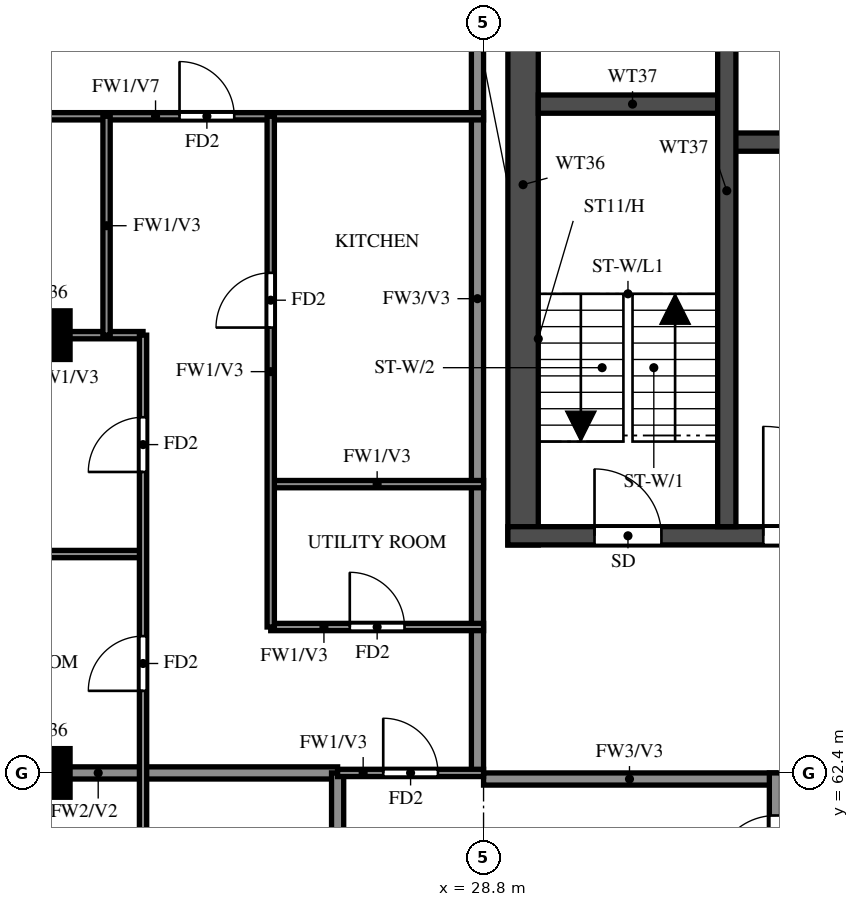
"""IFC4 building model, lengths in metres.
Left out: names, types, materials, properties, quantities, classifications, styles, units other than length and angle.
Written with IfcOpenShell. Run it as: python <this file> out.ifc"""

import sys

from ifc_helpers import new_model, si_unit, direction, frame, frame_2d, origin, origin_2d, place, context, subcontext, project, spatial, rectangle, extrude, source, transform, mapped, element, fill, save


model = new_model("IFC4")
c1 = context("Model", 3, precision=1e-05, world=origin(), true_north=direction((0.0, 1.0)))
c2 = subcontext(c1, "Body", "Model", "MODEL_VIEW")
j1 = project(units=[si_unit("LENGTHUNIT", "METRE"), si_unit("PLANEANGLEUNIT", "RADIAN")], contexts=[c1])
p1 = place(None, origin())
s1 = spatial("IfcSite", under=j1, at=p1, CompositionType="ELEMENT")
p2 = place(p1, origin())
s2 = spatial("IfcBuilding", under=s1, at=p2, CompositionType="ELEMENT")
p3 = place(p2, frame((0.0, 0.0, 246.5)))
s3 = spatial("IfcBuildingStorey", under=s2, at=p3, CompositionType="ELEMENT", Elevation=246.5)
m1 = source(origin(), c2, "Body", "SweptSolid", [
    extrude(rectangle(XDim=0.8, YDim=0.8, at=origin_2d()), origin(), (0.0, 0.0, 1.0), 3.22),
])
for number, where, z_axis, x_axis in (
    (1, (21.6, 62.4, 0.0), (0.0, 0.0, 1.0), (1.0, 0.0, 0.0)),
    (2, (21.6, 69.6, 0.0), (0.0, 0.0, 1.0), (1.0, 0.0, 0.0)),
):
    element("IfcColumn", number, at=place(p3, frame(where, z_axis=z_axis, x_axis=x_axis)), inside=s3, PredefinedType="COLUMN", context=c2, shape_type="MappedRepresentation", body=[
        mapped(m1, transform((0.0, 0.0, 0.0))),
    ])
p4 = place(p3, frame((29.45, 66.15, 0.0), z_axis=(0.0, 0.0, 1.0), x_axis=(0.0, 1.0, 0.0)))
e3 = element("IfcWall", 3, at=p4, inside=s3, PredefinedType="SHEAR", context=c2, shape_type="SweptSolid", body=[
    extrude(rectangle(XDim=11.85, YDim=0.5, at=frame_2d((5.925, 0.0))), origin(), (0.0, 0.0, 1.0), 3.22),
])
p5 = place(p3, frame((29.2, 66.3, 0.0), z_axis=(0.0, 0.0, 1.0), x_axis=(1.0, 0.0, 0.0)))
e4 = element("IfcWall", 4, at=p5, inside=s3, PredefinedType="SHEAR", context=c2, shape_type="SweptSolid", body=[
    extrude(rectangle(XDim=42.4, YDim=0.3, at=frame_2d((21.2, 0.0))), origin(), (0.0, 0.0, 1.0), 3.22),
])
p6 = place(p5, frame((1.425, 0.0, 0.0)))
e5 = element("IfcOpeningElement", 5, at=p6, cuts=e4, PredefinedType="OPENING", context=c2, shape_type="SweptSolid", body=[
    extrude(rectangle(XDim=1.1, YDim=2.1, at=frame_2d((0.55, 1.05))), frame((0.0, 0.16, 0.0), z_axis=(0.0, -1.0, 0.0), x_axis=(1.0, 0.0, 0.0)), (0.0, 0.0, 1.0), 0.32),
])
p7 = place(p5, frame((4.2, 0.0, 0.0)))
e6 = element("IfcOpeningElement", 6, at=p7, cuts=e4, PredefinedType="OPENING", context=c2, shape_type="SweptSolid", body=[
    extrude(rectangle(XDim=1.8, YDim=2.1, at=frame_2d((0.9, 1.05))), frame((0.0, 0.16, 0.0), z_axis=(0.0, -1.0, 0.0), x_axis=(1.0, 0.0, 0.0)), (0.0, 0.0, 1.0), 0.32),
])
p8 = place(p3, frame((32.8, 72.775, 0.0), z_axis=(0.0, 0.0, 1.0), x_axis=(1.0, 0.0, 0.0)))
e7 = element("IfcWall", 7, at=p8, inside=s3, PredefinedType="SHEAR", context=c2, shape_type="SweptSolid", body=[
    extrude(rectangle(XDim=35.2, YDim=0.3, at=frame_2d((17.6, 0.0))), origin(), (0.0, 0.0, 1.0), 3.22),
])
p9 = place(p8, frame((19.8, 0.0, 0.0)))
e8 = element("IfcOpeningElement", 8, at=p9, cuts=e7, PredefinedType="OPENING", context=c2, shape_type="SweptSolid", body=[
    extrude(rectangle(XDim=1.1, YDim=2.1, at=frame_2d((0.55, 1.05))), frame((0.0, 0.16, 0.0), z_axis=(0.0, -1.0, 0.0), x_axis=(1.0, 0.0, 0.0)), (0.0, 0.0, 1.0), 0.32),
])
p10 = place(p8, frame((27.725, 0.0, 0.0)))
e9 = element("IfcOpeningElement", 9, at=p10, cuts=e7, PredefinedType="OPENING", context=c2, shape_type="SweptSolid", body=[
    extrude(rectangle(XDim=1.1, YDim=2.1, at=frame_2d((0.55, 1.05))), frame((0.0, 0.16, 0.0), z_axis=(0.0, -1.0, 0.0), x_axis=(1.0, 0.0, 0.0)), (0.0, 0.0, 1.0), 0.32),
])
p11 = place(p8, frame((30.325, 0.0, 0.0)))
e10 = element("IfcOpeningElement", 10, at=p11, cuts=e7, PredefinedType="OPENING", context=c2, shape_type="SweptSolid", body=[
    extrude(rectangle(XDim=1.1, YDim=2.1, at=frame_2d((0.55, 1.05))), frame((0.0, 0.16, 0.0), z_axis=(0.0, -1.0, 0.0), x_axis=(1.0, 0.0, 0.0)), (0.0, 0.0, 1.0), 0.32),
])
p12 = place(p8, frame((3.825, 0.0, 0.0)))
e11 = element("IfcOpeningElement", 11, at=p12, cuts=e7, PredefinedType="OPENING", context=c2, shape_type="SweptSolid", body=[
    extrude(rectangle(XDim=1.1, YDim=2.1, at=frame_2d((0.55, 1.05))), frame((0.0, 0.16, 0.0), z_axis=(0.0, -1.0, 0.0), x_axis=(1.0, 0.0, 0.0)), (0.0, 0.0, 1.0), 0.32),
])
p13 = place(p8, frame((6.575, 0.0, 0.0)))
e12 = element("IfcOpeningElement", 12, at=p13, cuts=e7, PredefinedType="OPENING", context=c2, shape_type="SweptSolid", body=[
    extrude(rectangle(XDim=1.1, YDim=2.1, at=frame_2d((0.55, 1.05))), frame((0.0, 0.16, 0.0), z_axis=(0.0, -1.0, 0.0), x_axis=(1.0, 0.0, 0.0)), (0.0, 0.0, 1.0), 0.32),
])
p14 = place(p8, frame((9.325, 0.0, 0.0)))
e13 = element("IfcOpeningElement", 13, at=p14, cuts=e7, PredefinedType="OPENING", context=c2, shape_type="SweptSolid", body=[
    extrude(rectangle(XDim=1.1, YDim=2.1, at=frame_2d((0.55, 1.05))), frame((0.0, 0.16, 0.0), z_axis=(0.0, -1.0, 0.0), x_axis=(1.0, 0.0, 0.0)), (0.0, 0.0, 1.0), 0.32),
])
p15 = place(p8, frame((12.075, 0.0, 0.0)))
e14 = element("IfcOpeningElement", 14, at=p15, cuts=e7, PredefinedType="OPENING", context=c2, shape_type="SweptSolid", body=[
    extrude(rectangle(XDim=1.1, YDim=2.1, at=frame_2d((0.55, 1.05))), frame((0.0, 0.16, 0.0), z_axis=(0.0, -1.0, 0.0), x_axis=(1.0, 0.0, 0.0)), (0.0, 0.0, 1.0), 0.32),
])
p16 = place(p8, frame((14.825, 0.0, 0.0)))
e15 = element("IfcOpeningElement", 15, at=p16, cuts=e7, PredefinedType="OPENING", context=c2, shape_type="SweptSolid", body=[
    extrude(rectangle(XDim=1.1, YDim=2.1, at=frame_2d((0.55, 1.05))), frame((0.0, 0.16, 0.0), z_axis=(0.0, -1.0, 0.0), x_axis=(1.0, 0.0, 0.0)), (0.0, 0.0, 1.0), 0.32),
])
p17 = place(p8, frame((17.575, 0.0, 0.0)))
e16 = element("IfcOpeningElement", 16, at=p17, cuts=e7, PredefinedType="OPENING", context=c2, shape_type="SweptSolid", body=[
    extrude(rectangle(XDim=1.1, YDim=2.1, at=frame_2d((0.55, 1.05))), frame((0.0, 0.16, 0.0), z_axis=(0.0, -1.0, 0.0), x_axis=(1.0, 0.0, 0.0)), (0.0, 0.0, 1.0), 0.32),
])
p18 = place(p8, frame((0.95, 0.0, 0.0)))
e17 = element("IfcOpeningElement", 17, at=p18, cuts=e7, PredefinedType="OPENING", context=c2, shape_type="SweptSolid", body=[
    extrude(rectangle(XDim=1.1, YDim=2.1, at=frame_2d((0.55, 1.05))), frame((0.0, 0.16, 0.0), z_axis=(0.0, -1.0, 0.0), x_axis=(1.0, 0.0, 0.0)), (0.0, 0.0, 1.0), 0.32),
])
p19 = place(p3, frame((29.7, 73.4, 0.0), z_axis=(0.0, 0.0, 1.0), x_axis=(1.0, 0.0, 0.0)))
e18 = element("IfcWall", 18, at=p19, inside=s3, PredefinedType="SHEAR", context=c2, shape_type="SweptSolid", body=[
    extrude(rectangle(XDim=3.1, YDim=0.3, at=frame_2d((1.55, 0.0))), origin(), (0.0, 0.0, 1.0), 3.22),
])
p20 = place(p3, frame((32.8, 66.45, 0.0), z_axis=(0.0, 0.0, 1.0), x_axis=(0.0, 1.0, 0.0)))
e19 = element("IfcWall", 19, at=p20, inside=s3, PredefinedType="SHEAR", context=c2, shape_type="SweptSolid", body=[
    extrude(rectangle(XDim=11.05, YDim=0.3, at=frame_2d((5.525, 0.0))), origin(), (0.0, 0.0, 1.0), 3.22),
])
p21 = place(p3, frame((28.8, 62.3, 0.0), z_axis=(0.0, 0.0, 1.0), x_axis=(1.0, 0.0, 0.0)))
e20 = element("IfcWall", 20, at=p21, inside=s3, PredefinedType="SOLIDWALL", context=c2, shape_type="SweptSolid", body=[
    extrude(rectangle(XDim=4.8, YDim=0.2, at=frame_2d((2.4, 0.0))), origin(), (0.0, 0.0, 1.0), 3.22),
])
p22 = place(p3, frame((28.7, 62.4, 0.0), z_axis=(0.0, 0.0, 1.0), x_axis=(0.0, 1.0, 0.0)))
e21 = element("IfcWall", 21, at=p22, inside=s3, PredefinedType="SOLIDWALL", context=c2, shape_type="SweptSolid", body=[
    extrude(rectangle(XDim=15.6, YDim=0.2, at=frame_2d((7.8, 0.0))), origin(), (0.0, 0.0, 1.0), 3.22),
])
p23 = place(p3, frame((33.6, 45.6, 0.0), z_axis=(0.0, 0.0, 1.0), x_axis=(0.0, 1.0, 0.0)))
e22 = element("IfcWall", 22, at=p23, inside=s3, PredefinedType="SOLIDWALL", context=c2, shape_type="SweptSolid", body=[
    extrude(rectangle(XDim=16.8, YDim=0.2, at=frame_2d((8.4, 0.0))), origin(), (0.0, 0.0, 1.0), 3.22),
])
p24 = place(p23, frame((0.7, 0.0, 0.0)))
e23 = element("IfcOpeningElement", 23, at=p24, cuts=e22, PredefinedType="OPENING", context=c2, shape_type="SweptSolid", body=[
    extrude(rectangle(XDim=1.0, YDim=2.1, at=frame_2d((0.5, 1.05))), frame((0.0, 0.11, 0.0), z_axis=(0.0, -1.0, 0.0), x_axis=(1.0, 0.0, 0.0)), (0.0, 0.0, 1.0), 0.22),
])
p25 = place(p23, frame((8.3, 0.0, 0.0)))
e24 = element("IfcOpeningElement", 24, at=p25, cuts=e22, PredefinedType="OPENING", context=c2, shape_type="SweptSolid", body=[
    extrude(rectangle(XDim=1.0, YDim=2.1, at=frame_2d((0.5, 1.05))), frame((0.0, 0.11, 0.0), z_axis=(0.0, -1.0, 0.0), x_axis=(1.0, 0.0, 0.0)), (0.0, 0.0, 1.0), 0.22),
])
p26 = place(p23, frame((15.1, 0.0, 0.0)))
e25 = element("IfcOpeningElement", 25, at=p26, cuts=e22, PredefinedType="OPENING", context=c2, shape_type="SweptSolid", body=[
    extrude(rectangle(XDim=1.0, YDim=2.1, at=frame_2d((0.5, 1.05))), frame((0.0, 0.11, 0.0), z_axis=(0.0, -1.0, 0.0), x_axis=(1.0, 0.0, 0.0)), (0.0, 0.0, 1.0), 0.22),
])
p27 = place(p3, frame((18.525, 62.4, 0.0), z_axis=(0.0, 0.0, 1.0), x_axis=(1.0, 0.0, 0.0)))
e26 = element("IfcWall", 26, at=p27, inside=s3, PredefinedType="SOLIDWALL", context=c2, shape_type="SweptSolid", body=[
    extrude(rectangle(XDim=7.875, YDim=0.2, at=frame_2d((3.938, 0.0))), origin(), (0.0, 0.0, 1.0), 3.22),
])
p28 = place(p3, frame((26.4, 60.0, 0.0), z_axis=(0.0, 0.0, 1.0), x_axis=(0.0, 1.0, 0.0)))
e27 = element("IfcWall", 27, at=p28, inside=s3, PredefinedType="SOLIDWALL", context=c2, shape_type="SweptSolid", body=[
    extrude(rectangle(XDim=2.4, YDim=0.2, at=frame_2d((1.2, 0.0))), origin(), (0.0, 0.0, 1.0), 3.22),
])
p29 = place(p3, frame((26.4, 62.4, 0.0), z_axis=(0.0, 0.0, 1.0), x_axis=(1.0, 0.0, 0.0)))
e28 = element("IfcWall", 28, at=p29, inside=s3, PredefinedType="PARTITIONING", context=c2, shape_type="SweptSolid", body=[
    extrude(rectangle(XDim=2.4, YDim=0.12, at=frame_2d((1.2, 0.0))), origin(), (0.0, 0.0, 1.0), 3.22),
])
p30 = place(p29, frame((0.75, 0.0, 0.0)))
e29 = element("IfcOpeningElement", 29, at=p30, cuts=e28, PredefinedType="OPENING", context=c2, shape_type="SweptSolid", body=[
    extrude(rectangle(XDim=0.9, YDim=2.1, at=frame_2d((0.45, 1.05))), frame((0.0, 0.07, 0.0), z_axis=(0.0, -1.0, 0.0), x_axis=(1.0, 0.0, 0.0)), (0.0, 0.0, 1.0), 0.14),
])
p31 = place(p3, frame((25.3, 64.8, 0.0), z_axis=(0.0, 0.0, 1.0), x_axis=(1.0, 0.0, 0.0)))
e30 = element("IfcWall", 30, at=p31, inside=s3, PredefinedType="PARTITIONING", context=c2, shape_type="SweptSolid", body=[
    extrude(rectangle(XDim=3.5, YDim=0.12, at=frame_2d((1.75, 0.0))), origin(), (0.0, 0.0, 1.0), 3.22),
])
p32 = place(p31, frame((1.3, 0.0, 0.0)))
e31 = element("IfcOpeningElement", 31, at=p32, cuts=e30, PredefinedType="OPENING", context=c2, shape_type="SweptSolid", body=[
    extrude(rectangle(XDim=0.9, YDim=2.1, at=frame_2d((0.45, 1.05))), frame((0.0, 0.07, 0.0), z_axis=(0.0, -1.0, 0.0), x_axis=(1.0, 0.0, 0.0)), (0.0, 0.0, 1.0), 0.14),
])
p33 = place(p3, frame((18.525, 66.0, 0.0), z_axis=(0.0, 0.0, 1.0), x_axis=(1.0, 0.0, 0.0)))
e32 = element("IfcWall", 32, at=p33, inside=s3, PredefinedType="PARTITIONING", context=c2, shape_type="SweptSolid", body=[
    extrude(rectangle(XDim=4.675, YDim=0.12, at=frame_2d((2.337, 0.0))), origin(), (0.0, 0.0, 1.0), 2.32),
])
p34 = place(p3, frame((25.3, 67.15, 0.0), z_axis=(0.0, 0.0, 1.0), x_axis=(1.0, 0.0, 0.0)))
e33 = element("IfcWall", 33, at=p34, inside=s3, PredefinedType="PARTITIONING", context=c2, shape_type="SweptSolid", body=[
    extrude(rectangle(XDim=3.5, YDim=0.12, at=frame_2d((1.75, 0.0))), origin(), (0.0, 0.0, 1.0), 3.22),
])
p35 = place(p3, frame((18.525, 69.6, 0.0), z_axis=(0.0, 0.0, 1.0), x_axis=(1.0, 0.0, 0.0)))
e34 = element("IfcWall", 34, at=p35, inside=s3, PredefinedType="PARTITIONING", context=c2, shape_type="SweptSolid", body=[
    extrude(rectangle(XDim=4.675, YDim=0.12, at=frame_2d((2.337, 0.0))), origin(), (0.0, 0.0, 1.0), 3.22),
])
p36 = place(p35, frame((1.538, 0.0, 0.0)))
e35 = element("IfcOpeningElement", 35, at=p36, cuts=e34, PredefinedType="OPENING", context=c2, shape_type="SweptSolid", body=[
    extrude(rectangle(XDim=0.8, YDim=2.1, at=frame_2d((0.4, 1.05))), frame((0.0, 0.07, 0.0), z_axis=(0.0, -1.0, 0.0), x_axis=(1.0, 0.0, 0.0)), (0.0, 0.0, 1.0), 0.14),
])
p37 = place(p3, frame((18.525, 73.2, 0.0), z_axis=(0.0, 0.0, 1.0), x_axis=(1.0, 0.0, 0.0)))
e36 = element("IfcWall", 36, at=p37, inside=s3, PredefinedType="PARTITIONING", context=c2, shape_type="SweptSolid", body=[
    extrude(rectangle(XDim=10.275, YDim=0.12, at=frame_2d((5.138, 0.0))), origin(), (0.0, 0.0, 1.0), 2.32),
])
p38 = place(p37, frame((5.275, 0.0, 0.0)))
e37 = element("IfcOpeningElement", 37, at=p38, cuts=e36, PredefinedType="OPENING", context=c2, shape_type="SweptSolid", body=[
    extrude(rectangle(XDim=0.9, YDim=2.1, at=frame_2d((0.45, 1.05))), frame((0.0, 0.07, 0.0), z_axis=(0.0, -1.0, 0.0), x_axis=(1.0, 0.0, 0.0)), (0.0, 0.0, 1.0), 0.14),
])
p39 = place(p3, frame((22.6, 69.6, 0.0), z_axis=(0.0, 0.0, 1.0), x_axis=(0.0, 1.0, 0.0)))
e38 = element("IfcWall", 38, at=p39, inside=s3, PredefinedType="PARTITIONING", context=c2, shape_type="SweptSolid", body=[
    extrude(rectangle(XDim=3.6, YDim=0.12, at=frame_2d((1.8, 0.0))), origin(), (0.0, 0.0, 1.0), 3.22),
])
p40 = place(p3, frame((23.2, 48.0, 0.0), z_axis=(0.0, 0.0, 1.0), x_axis=(0.0, 1.0, 0.0)))
e39 = element("IfcWall", 39, at=p40, inside=s3, PredefinedType="PARTITIONING", context=c2, shape_type="SweptSolid", body=[
    extrude(rectangle(XDim=21.6, YDim=0.12, at=frame_2d((10.8, 0.0))), origin(), (0.0, 0.0, 1.0), 3.22),
])
p41 = place(p40, frame((1.35, 0.0, 0.0)))
e40 = element("IfcOpeningElement", 40, at=p41, cuts=e39, PredefinedType="OPENING", context=c2, shape_type="SweptSolid", body=[
    extrude(rectangle(XDim=0.9, YDim=2.1, at=frame_2d((0.45, 1.05))), frame((0.0, 0.07, 0.0), z_axis=(0.0, -1.0, 0.0), x_axis=(1.0, 0.0, 0.0)), (0.0, 0.0, 1.0), 0.14),
])
p42 = place(p40, frame((7.95, 0.0, 0.0)))
e41 = element("IfcOpeningElement", 41, at=p42, cuts=e39, PredefinedType="OPENING", context=c2, shape_type="SweptSolid", body=[
    extrude(rectangle(XDim=1.5, YDim=2.1, at=frame_2d((0.75, 1.05))), frame((0.0, 0.07, 0.0), z_axis=(0.0, -1.0, 0.0), x_axis=(1.0, 0.0, 0.0)), (0.0, 0.0, 1.0), 0.14),
])
p43 = place(p40, frame((12.15, 0.0, 0.0)))
e42 = element("IfcOpeningElement", 42, at=p43, cuts=e39, PredefinedType="OPENING", context=c2, shape_type="SweptSolid", body=[
    extrude(rectangle(XDim=0.9, YDim=2.1, at=frame_2d((0.45, 1.05))), frame((0.0, 0.07, 0.0), z_axis=(0.0, -1.0, 0.0), x_axis=(1.0, 0.0, 0.0)), (0.0, 0.0, 1.0), 0.14),
])
p44 = place(p40, frame((15.75, 0.0, 0.0)))
e43 = element("IfcOpeningElement", 43, at=p44, cuts=e39, PredefinedType="OPENING", context=c2, shape_type="SweptSolid", body=[
    extrude(rectangle(XDim=0.9, YDim=2.1, at=frame_2d((0.45, 1.05))), frame((0.0, 0.07, 0.0), z_axis=(0.0, -1.0, 0.0), x_axis=(1.0, 0.0, 0.0)), (0.0, 0.0, 1.0), 0.14),
])
p45 = place(p40, frame((19.35, 0.0, 0.0)))
e44 = element("IfcOpeningElement", 44, at=p45, cuts=e39, PredefinedType="OPENING", context=c2, shape_type="SweptSolid", body=[
    extrude(rectangle(XDim=0.9, YDim=2.1, at=frame_2d((0.45, 1.05))), frame((0.0, 0.07, 0.0), z_axis=(0.0, -1.0, 0.0), x_axis=(1.0, 0.0, 0.0)), (0.0, 0.0, 1.0), 0.14),
])
p46 = place(p3, frame((25.3, 64.8, 0.0), z_axis=(0.0, 0.0, 1.0), x_axis=(0.0, 1.0, 0.0)))
e45 = element("IfcWall", 45, at=p46, inside=s3, PredefinedType="PARTITIONING", context=c2, shape_type="SweptSolid", body=[
    extrude(rectangle(XDim=8.4, YDim=0.12, at=frame_2d((4.2, 0.0))), origin(), (0.0, 0.0, 1.0), 3.22),
])
p47 = place(p46, frame((4.925, 0.0, 0.0)))
e46 = element("IfcOpeningElement", 46, at=p47, cuts=e45, PredefinedType="OPENING", context=c2, shape_type="SweptSolid", body=[
    extrude(rectangle(XDim=0.9, YDim=2.1, at=frame_2d((0.45, 1.05))), frame((0.0, 0.07, 0.0), z_axis=(0.0, -1.0, 0.0), x_axis=(1.0, 0.0, 0.0)), (0.0, 0.0, 1.0), 0.14),
])
p48 = place(p6, origin())
e47 = element("IfcDoor", 47, at=p48, inside=s3, OperationType="SINGLE_SWING_LEFT", PredefinedType="DOOR", context=c2, shape_type="SweptSolid", body=[
    extrude(rectangle(XDim=1.1, YDim=2.1, at=frame_2d((0.55, 1.05))), frame((0.0, 0.025, 0.0), z_axis=(0.0, -1.0, 0.0), x_axis=(1.0, 0.0, 0.0)), (0.0, 0.0, 1.0), 0.05),
])
fill(e5, e47)
p49 = place(p7, origin())
e48 = element("IfcDoor", 48, at=p49, inside=s3, OperationType="DOUBLE_DOOR_SINGLE_SWING", PredefinedType="DOOR", context=c2, shape_type="SweptSolid", body=[
    extrude(rectangle(XDim=1.8, YDim=2.1, at=frame_2d((0.9, 1.05))), frame((0.0, 0.025, 0.0), z_axis=(0.0, -1.0, 0.0), x_axis=(1.0, 0.0, 0.0)), (0.0, 0.0, 1.0), 0.05),
])
fill(e6, e48)
p50 = place(p30, origin())
e49 = element("IfcDoor", 49, at=p50, inside=s3, OperationType="SINGLE_SWING_LEFT", PredefinedType="DOOR", context=c2, shape_type="SweptSolid", body=[
    extrude(rectangle(XDim=0.9, YDim=2.1, at=frame_2d((0.45, 1.05))), frame((0.0, 0.025, 0.0), z_axis=(0.0, -1.0, 0.0), x_axis=(1.0, 0.0, 0.0)), (0.0, 0.0, 1.0), 0.05),
])
fill(e29, e49)
p51 = place(p26, origin())
e50 = element("IfcDoor", 50, at=p51, inside=s3, OperationType="SINGLE_SWING_LEFT", PredefinedType="DOOR", context=c2, shape_type="SweptSolid", body=[
    extrude(rectangle(XDim=1.0, YDim=2.1, at=frame_2d((0.5, 1.05))), frame((0.0, 0.025, 0.0), z_axis=(0.0, -1.0, 0.0), x_axis=(1.0, 0.0, 0.0)), (0.0, 0.0, 1.0), 0.05),
])
fill(e25, e50)
p52 = place(p44, origin())
e51 = element("IfcDoor", 51, at=p52, inside=s3, OperationType="SINGLE_SWING_RIGHT", PredefinedType="DOOR", context=c2, shape_type="SweptSolid", body=[
    extrude(rectangle(XDim=0.9, YDim=2.1, at=frame_2d((0.45, 1.05))), frame((0.0, 0.025, 0.0), z_axis=(0.0, -1.0, 0.0), x_axis=(1.0, 0.0, 0.0)), (0.0, 0.0, 1.0), 0.05),
])
fill(e43, e51)
p53 = place(p45, origin())
e52 = element("IfcDoor", 52, at=p53, inside=s3, OperationType="SINGLE_SWING_LEFT", PredefinedType="DOOR", context=c2, shape_type="SweptSolid", body=[
    extrude(rectangle(XDim=0.9, YDim=2.1, at=frame_2d((0.45, 1.05))), frame((0.0, 0.025, 0.0), z_axis=(0.0, -1.0, 0.0), x_axis=(1.0, 0.0, 0.0)), (0.0, 0.0, 1.0), 0.05),
])
fill(e44, e52)
p54 = place(p38, origin())
e53 = element("IfcDoor", 53, at=p54, inside=s3, OperationType="SINGLE_SWING_RIGHT", PredefinedType="DOOR", context=c2, shape_type="SweptSolid", body=[
    extrude(rectangle(XDim=0.9, YDim=2.1, at=frame_2d((0.45, 1.05))), frame((0.0, 0.025, 0.0), z_axis=(0.0, -1.0, 0.0), x_axis=(1.0, 0.0, 0.0)), (0.0, 0.0, 1.0), 0.05),
])
fill(e37, e53)
p55 = place(p32, origin())
e54 = element("IfcDoor", 54, at=p55, inside=s3, OperationType="SINGLE_SWING_LEFT", PredefinedType="DOOR", context=c2, shape_type="SweptSolid", body=[
    extrude(rectangle(XDim=0.9, YDim=2.1, at=frame_2d((0.45, 1.05))), frame((0.0, 0.025, 0.0), z_axis=(0.0, -1.0, 0.0), x_axis=(1.0, 0.0, 0.0)), (0.0, 0.0, 1.0), 0.05),
])
fill(e31, e54)
p56 = place(p47, origin())
e55 = element("IfcDoor", 55, at=p56, inside=s3, OperationType="SINGLE_SWING_LEFT", PredefinedType="DOOR", context=c2, shape_type="SweptSolid", body=[
    extrude(rectangle(XDim=0.9, YDim=2.1, at=frame_2d((0.45, 1.05))), frame((0.0, 0.025, 0.0), z_axis=(0.0, -1.0, 0.0), x_axis=(1.0, 0.0, 0.0)), (0.0, 0.0, 1.0), 0.05),
])
fill(e46, e55)
save(model, sys.argv[1])
